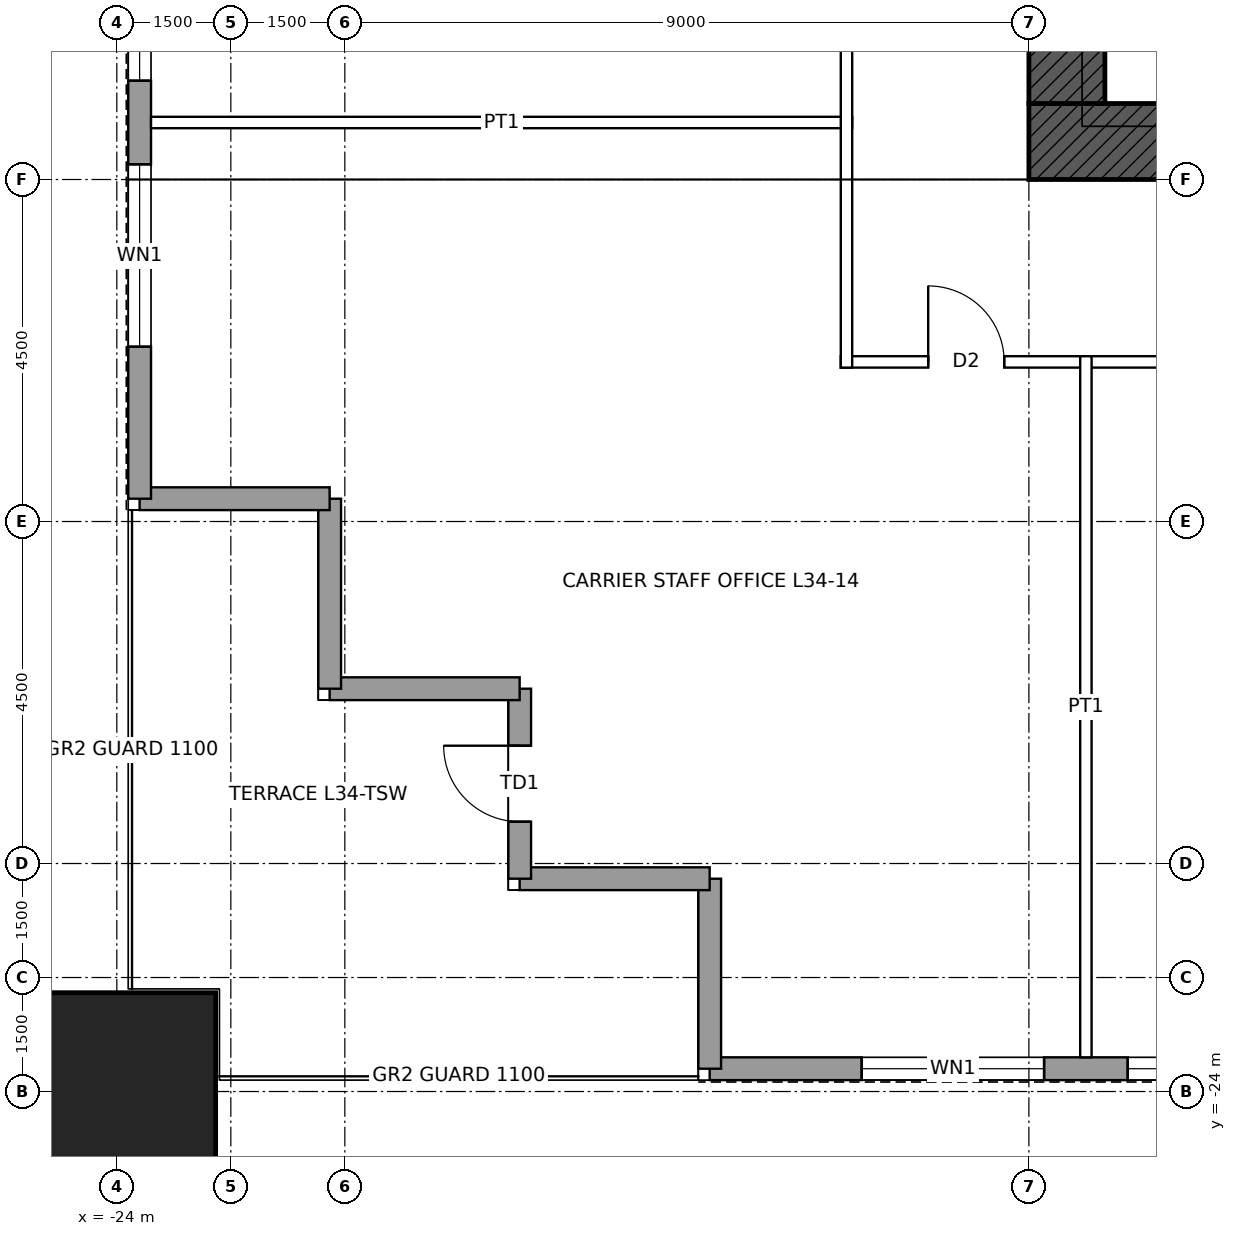
"""IFC4 building model, lengths in metres.
Left out: names, types, materials, properties, quantities, classifications, styles, units other than length and angle.
Written with IfcOpenShell. Run it as: python <this file> out.ifc"""

import sys

from ifc_helpers import new_model, si_unit, direction, frame, frame_2d, origin, origin_2d, place, context, subcontext, project, spatial, rectangle, hollow_rectangle, extrude, element, fill, save


model = new_model("IFC4")
c1 = context("Model", 3, precision=1e-05, world=origin(), true_north=direction((0.0, 1.0)))
c2 = subcontext(c1, "Body", "Model", "MODEL_VIEW")
j1 = project(units=[si_unit("LENGTHUNIT", "METRE"), si_unit("PLANEANGLEUNIT", "RADIAN")], contexts=[c1])
p1 = place(None, origin())
s1 = spatial("IfcSite", under=j1, at=p1, CompositionType="ELEMENT")
p2 = place(p1, origin())
s2 = spatial("IfcBuilding", under=s1, at=p2, CompositionType="ELEMENT")
p3 = place(p2, frame((0.0, 0.0, 167.4)))
s3 = spatial("IfcBuildingStorey", under=s2, at=p3, CompositionType="ELEMENT", Elevation=167.4)
p4 = place(p3, frame((-24.0, -24.0, 0.0), z_axis=(0.0, 0.0, 1.0), x_axis=(1.0, 0.0, 0.0)))
e1 = element("IfcColumn", 1, at=p4, inside=s3, PredefinedType="COLUMN", context=c2, shape_type="SweptSolid", body=[
    extrude(hollow_rectangle(XDim=2.6, YDim=2.6, WallThickness=0.13, at=origin_2d()), origin(), (0.0, 0.0, 1.0), 4.5),
])
p5 = place(p3, frame((12.0, -11.5, 0.0), z_axis=(0.0, 0.0, 1.0), x_axis=(-1.0, 0.0, 0.0)))
e2 = element("IfcWall", 2, at=p5, inside=s3, PredefinedType="SHEAR", context=c2, shape_type="SweptSolid", body=[
    extrude(rectangle(XDim=24.0, YDim=1.0, at=frame_2d((12.0, 0.0))), origin(), (0.0, 0.0, 1.0), 4.5),
])
p6 = place(p5, frame((11.5, 0.0, 0.0)))
e3 = element("IfcOpeningElement", 3, at=p6, cuts=e2, PredefinedType="OPENING", context=c2, shape_type="SweptSolid", body=[
    extrude(rectangle(XDim=1.0, YDim=2.1, at=frame_2d((0.5, 1.05))), frame((0.0, 0.51, 0.0), z_axis=(0.0, -1.0, 0.0), x_axis=(1.0, 0.0, 0.0)), (0.0, 0.0, 1.0), 1.02),
])
p7 = place(p5, frame((1.0, 0.0, 0.0)))
e4 = element("IfcOpeningElement", 4, at=p7, cuts=e2, PredefinedType="OPENING", context=c2, shape_type="SweptSolid", body=[
    extrude(rectangle(XDim=1.0, YDim=2.4, at=frame_2d((0.5, 1.2))), frame((0.0, 0.51, 0.0), z_axis=(0.0, -1.0, 0.0), x_axis=(1.0, 0.0, 0.0)), (0.0, 0.0, 1.0), 1.02),
])
p8 = place(p3, frame((-11.5, -11.0, 0.0), z_axis=(0.0, 0.0, 1.0), x_axis=(0.0, 1.0, 0.0)))
e5 = element("IfcWall", 5, at=p8, inside=s3, PredefinedType="SHEAR", context=c2, shape_type="SweptSolid", body=[
    extrude(rectangle(XDim=22.0, YDim=1.0, at=frame_2d((11.0, 0.0))), origin(), (0.0, 0.0, 1.0), 4.5),
])
p9 = place(p8, frame((10.5, 0.0, 0.0)))
e6 = element("IfcOpeningElement", 6, at=p9, cuts=e5, PredefinedType="OPENING", context=c2, shape_type="SweptSolid", body=[
    extrude(rectangle(XDim=1.0, YDim=2.4, at=frame_2d((0.5, 1.2))), frame((0.0, 0.51, 0.0), z_axis=(0.0, -1.0, 0.0), x_axis=(1.0, 0.0, 0.0)), (0.0, 0.0, 1.0), 1.02),
])
p10 = place(p3, frame((16.2, -23.7, 0.0), z_axis=(0.0, 0.0, 1.0), x_axis=(-1.0, 0.0, 0.0)))
e7 = element("IfcWall", 7, at=p10, inside=s3, PredefinedType="SOLIDWALL", context=c2, shape_type="SweptSolid", body=[
    extrude(rectangle(XDim=32.4, YDim=0.3, at=frame_2d((16.2, 0.0))), origin(), (0.0, 0.0, 1.0), 4.25),
])
p11 = place(p10, frame((2.0, 0.0, 1.0)))
e8 = element("IfcOpeningElement", 8, at=p11, cuts=e7, PredefinedType="OPENING", context=c2, shape_type="SweptSolid", body=[
    extrude(rectangle(XDim=2.4, YDim=1.2, at=frame_2d((1.2, 0.6))), frame((0.0, 0.16, 0.0), z_axis=(0.0, -1.0, 0.0), x_axis=(1.0, 0.0, 0.0)), (0.0, 0.0, 1.0), 0.32),
])
p12 = place(p10, frame((5.5, 0.0, 1.0)))
e9 = element("IfcOpeningElement", 9, at=p12, cuts=e7, PredefinedType="OPENING", context=c2, shape_type="SweptSolid", body=[
    extrude(rectangle(XDim=2.4, YDim=1.2, at=frame_2d((1.2, 0.6))), frame((0.0, 0.16, 0.0), z_axis=(0.0, -1.0, 0.0), x_axis=(1.0, 0.0, 0.0)), (0.0, 0.0, 1.0), 0.32),
])
p13 = place(p10, frame((9.5, 0.0, 1.0)))
e10 = element("IfcOpeningElement", 10, at=p13, cuts=e7, PredefinedType="OPENING", context=c2, shape_type="SweptSolid", body=[
    extrude(rectangle(XDim=2.4, YDim=1.2, at=frame_2d((1.2, 0.6))), frame((0.0, 0.16, 0.0), z_axis=(0.0, -1.0, 0.0), x_axis=(1.0, 0.0, 0.0)), (0.0, 0.0, 1.0), 0.32),
])
p14 = place(p10, frame((13.0, 0.0, 1.0)))
e11 = element("IfcOpeningElement", 11, at=p14, cuts=e7, PredefinedType="OPENING", context=c2, shape_type="SweptSolid", body=[
    extrude(rectangle(XDim=2.4, YDim=1.2, at=frame_2d((1.2, 0.6))), frame((0.0, 0.16, 0.0), z_axis=(0.0, -1.0, 0.0), x_axis=(1.0, 0.0, 0.0)), (0.0, 0.0, 1.0), 0.32),
])
p15 = place(p10, frame((17.0, 0.0, 1.0)))
e12 = element("IfcOpeningElement", 12, at=p15, cuts=e7, PredefinedType="OPENING", context=c2, shape_type="SweptSolid", body=[
    extrude(rectangle(XDim=2.4, YDim=1.2, at=frame_2d((1.2, 0.6))), frame((0.0, 0.16, 0.0), z_axis=(0.0, -1.0, 0.0), x_axis=(1.0, 0.0, 0.0)), (0.0, 0.0, 1.0), 0.32),
])
p16 = place(p10, frame((20.5, 0.0, 1.0)))
e13 = element("IfcOpeningElement", 13, at=p16, cuts=e7, PredefinedType="OPENING", context=c2, shape_type="SweptSolid", body=[
    extrude(rectangle(XDim=2.4, YDim=1.2, at=frame_2d((1.2, 0.6))), frame((0.0, 0.16, 0.0), z_axis=(0.0, -1.0, 0.0), x_axis=(1.0, 0.0, 0.0)), (0.0, 0.0, 1.0), 0.32),
])
p17 = place(p10, frame((24.5, 0.0, 1.0)))
e14 = element("IfcOpeningElement", 14, at=p17, cuts=e7, PredefinedType="OPENING", context=c2, shape_type="SweptSolid", body=[
    extrude(rectangle(XDim=2.4, YDim=1.2, at=frame_2d((1.2, 0.6))), frame((0.0, 0.16, 0.0), z_axis=(0.0, -1.0, 0.0), x_axis=(1.0, 0.0, 0.0)), (0.0, 0.0, 1.0), 0.32),
])
p18 = place(p10, frame((28.0, 0.0, 1.0)))
e15 = element("IfcOpeningElement", 15, at=p18, cuts=e7, PredefinedType="OPENING", context=c2, shape_type="SweptSolid", body=[
    extrude(rectangle(XDim=2.4, YDim=1.2, at=frame_2d((1.2, 0.6))), frame((0.0, 0.16, 0.0), z_axis=(0.0, -1.0, 0.0), x_axis=(1.0, 0.0, 0.0)), (0.0, 0.0, 1.0), 0.32),
])
for number, where, z_axis, x_axis in (
    (16, (-16.2, -23.7, 0.0), (0.0, 0.0, 1.0), (0.0, 1.0, 0.0)),
    (17, (-16.2, -21.2, 0.0), (0.0, 0.0, 1.0), (-1.0, 0.0, 0.0)),
):
    element("IfcWall", number, at=place(p3, frame(where, z_axis=z_axis, x_axis=x_axis)), inside=s3, PredefinedType="SOLIDWALL", context=c2, shape_type="SweptSolid", body=[
        extrude(rectangle(XDim=2.5, YDim=0.3, at=frame_2d((1.25, 0.0))), origin(), (0.0, 0.0, 1.0), 4.25),
    ])
p19 = place(p3, frame((-18.7, -21.2, 0.0), z_axis=(0.0, 0.0, 1.0), x_axis=(0.0, 1.0, 0.0)))
e18 = element("IfcWall", 18, at=p19, inside=s3, PredefinedType="SOLIDWALL", context=c2, shape_type="SweptSolid", body=[
    extrude(rectangle(XDim=2.5, YDim=0.3, at=frame_2d((1.25, 0.0))), origin(), (0.0, 0.0, 1.0), 4.25),
])
p20 = place(p19, frame((0.75, 0.0, 0.0)))
e19 = element("IfcOpeningElement", 19, at=p20, cuts=e18, PredefinedType="OPENING", context=c2, shape_type="SweptSolid", body=[
    extrude(rectangle(XDim=1.0, YDim=2.4, at=frame_2d((0.5, 1.2))), frame((0.0, 0.16, 0.0), z_axis=(0.0, -1.0, 0.0), x_axis=(1.0, 0.0, 0.0)), (0.0, 0.0, 1.0), 0.32),
])
for number, where, z_axis, x_axis in (
    (20, (-18.7, -18.7, 0.0), (0.0, 0.0, 1.0), (-1.0, 0.0, 0.0)),
    (21, (-21.2, -18.7, 0.0), (0.0, 0.0, 1.0), (0.0, 1.0, 0.0)),
    (22, (-21.2, -16.2, 0.0), (0.0, 0.0, 1.0), (-1.0, 0.0, 0.0)),
):
    element("IfcWall", number, at=place(p3, frame(where, z_axis=z_axis, x_axis=x_axis)), inside=s3, PredefinedType="SOLIDWALL", context=c2, shape_type="SweptSolid", body=[
        extrude(rectangle(XDim=2.5, YDim=0.3, at=frame_2d((1.25, 0.0))), origin(), (0.0, 0.0, 1.0), 4.25),
    ])
p21 = place(p3, frame((-23.7, -16.2, 0.0), z_axis=(0.0, 0.0, 1.0), x_axis=(0.0, 1.0, 0.0)))
e23 = element("IfcWall", 23, at=p21, inside=s3, PredefinedType="SOLIDWALL", context=c2, shape_type="SweptSolid", body=[
    extrude(rectangle(XDim=32.4, YDim=0.3, at=frame_2d((16.2, 0.0))), origin(), (0.0, 0.0, 1.0), 4.25),
])
p22 = place(p21, frame((2.0, 0.0, 1.0)))
e24 = element("IfcOpeningElement", 24, at=p22, cuts=e23, PredefinedType="OPENING", context=c2, shape_type="SweptSolid", body=[
    extrude(rectangle(XDim=2.4, YDim=1.2, at=frame_2d((1.2, 0.6))), frame((0.0, 0.16, 0.0), z_axis=(0.0, -1.0, 0.0), x_axis=(1.0, 0.0, 0.0)), (0.0, 0.0, 1.0), 0.32),
])
p23 = place(p21, frame((5.5, 0.0, 1.0)))
e25 = element("IfcOpeningElement", 25, at=p23, cuts=e23, PredefinedType="OPENING", context=c2, shape_type="SweptSolid", body=[
    extrude(rectangle(XDim=2.4, YDim=1.2, at=frame_2d((1.2, 0.6))), frame((0.0, 0.16, 0.0), z_axis=(0.0, -1.0, 0.0), x_axis=(1.0, 0.0, 0.0)), (0.0, 0.0, 1.0), 0.32),
])
p24 = place(p21, frame((9.5, 0.0, 1.0)))
e26 = element("IfcOpeningElement", 26, at=p24, cuts=e23, PredefinedType="OPENING", context=c2, shape_type="SweptSolid", body=[
    extrude(rectangle(XDim=2.4, YDim=1.2, at=frame_2d((1.2, 0.6))), frame((0.0, 0.16, 0.0), z_axis=(0.0, -1.0, 0.0), x_axis=(1.0, 0.0, 0.0)), (0.0, 0.0, 1.0), 0.32),
])
p25 = place(p21, frame((13.0, 0.0, 1.0)))
e27 = element("IfcOpeningElement", 27, at=p25, cuts=e23, PredefinedType="OPENING", context=c2, shape_type="SweptSolid", body=[
    extrude(rectangle(XDim=2.4, YDim=1.2, at=frame_2d((1.2, 0.6))), frame((0.0, 0.16, 0.0), z_axis=(0.0, -1.0, 0.0), x_axis=(1.0, 0.0, 0.0)), (0.0, 0.0, 1.0), 0.32),
])
p26 = place(p21, frame((17.0, 0.0, 1.0)))
e28 = element("IfcOpeningElement", 28, at=p26, cuts=e23, PredefinedType="OPENING", context=c2, shape_type="SweptSolid", body=[
    extrude(rectangle(XDim=2.4, YDim=1.2, at=frame_2d((1.2, 0.6))), frame((0.0, 0.16, 0.0), z_axis=(0.0, -1.0, 0.0), x_axis=(1.0, 0.0, 0.0)), (0.0, 0.0, 1.0), 0.32),
])
p27 = place(p21, frame((20.5, 0.0, 1.0)))
e29 = element("IfcOpeningElement", 29, at=p27, cuts=e23, PredefinedType="OPENING", context=c2, shape_type="SweptSolid", body=[
    extrude(rectangle(XDim=2.4, YDim=1.2, at=frame_2d((1.2, 0.6))), frame((0.0, 0.16, 0.0), z_axis=(0.0, -1.0, 0.0), x_axis=(1.0, 0.0, 0.0)), (0.0, 0.0, 1.0), 0.32),
])
p28 = place(p21, frame((24.5, 0.0, 1.0)))
e30 = element("IfcOpeningElement", 30, at=p28, cuts=e23, PredefinedType="OPENING", context=c2, shape_type="SweptSolid", body=[
    extrude(rectangle(XDim=2.4, YDim=1.2, at=frame_2d((1.2, 0.6))), frame((0.0, 0.16, 0.0), z_axis=(0.0, -1.0, 0.0), x_axis=(1.0, 0.0, 0.0)), (0.0, 0.0, 1.0), 0.32),
])
p29 = place(p21, frame((28.0, 0.0, 1.0)))
e31 = element("IfcOpeningElement", 31, at=p29, cuts=e23, PredefinedType="OPENING", context=c2, shape_type="SweptSolid", body=[
    extrude(rectangle(XDim=2.4, YDim=1.2, at=frame_2d((1.2, 0.6))), frame((0.0, 0.16, 0.0), z_axis=(0.0, -1.0, 0.0), x_axis=(1.0, 0.0, 0.0)), (0.0, 0.0, 1.0), 0.32),
])
p30 = place(p3, frame((-14.475, -14.4, 0.0), z_axis=(0.0, 0.0, 1.0), x_axis=(1.0, 0.0, 0.0)))
e32 = element("IfcWall", 32, at=p30, inside=s3, PredefinedType="PARTITIONING", context=c2, shape_type="SweptSolid", body=[
    extrude(rectangle(XDim=28.95, YDim=0.15, at=frame_2d((14.475, 0.0))), origin(), (0.0, 0.0, 1.0), 4.25),
])
p31 = place(p30, frame((21.075, 0.0, 0.0)))
e33 = element("IfcOpeningElement", 33, at=p31, cuts=e32, PredefinedType="OPENING", context=c2, shape_type="SweptSolid", body=[
    extrude(rectangle(XDim=1.8, YDim=2.4, at=frame_2d((0.9, 1.2))), frame((0.0, 0.085, 0.0), z_axis=(0.0, -1.0, 0.0), x_axis=(1.0, 0.0, 0.0)), (0.0, 0.0, 1.0), 0.17),
])
p32 = place(p30, frame((9.825, 0.0, 0.0)))
e34 = element("IfcOpeningElement", 34, at=p32, cuts=e32, PredefinedType="OPENING", context=c2, shape_type="SweptSolid", body=[
    extrude(rectangle(XDim=1.8, YDim=2.4, at=frame_2d((0.9, 1.2))), frame((0.0, 0.085, 0.0), z_axis=(0.0, -1.0, 0.0), x_axis=(1.0, 0.0, 0.0)), (0.0, 0.0, 1.0), 0.17),
])
p33 = place(p30, frame((26.8, 0.0, 0.0)))
e35 = element("IfcOpeningElement", 35, at=p33, cuts=e32, PredefinedType="OPENING", context=c2, shape_type="SweptSolid", body=[
    extrude(rectangle(XDim=1.0, YDim=2.1, at=frame_2d((0.5, 1.05))), frame((0.0, 0.085, 0.0), z_axis=(0.0, -1.0, 0.0), x_axis=(1.0, 0.0, 0.0)), (0.0, 0.0, 1.0), 0.17),
])
p34 = place(p30, frame((1.15, 0.0, 0.0)))
e36 = element("IfcOpeningElement", 36, at=p34, cuts=e32, PredefinedType="OPENING", context=c2, shape_type="SweptSolid", body=[
    extrude(rectangle(XDim=1.0, YDim=2.1, at=frame_2d((0.5, 1.05))), frame((0.0, 0.085, 0.0), z_axis=(0.0, -1.0, 0.0), x_axis=(1.0, 0.0, 0.0)), (0.0, 0.0, 1.0), 0.17),
])
p35 = place(p3, frame((-23.55, -11.25, 0.0), z_axis=(0.0, 0.0, 1.0), x_axis=(1.0, 0.0, 0.0)))
e37 = element("IfcWall", 37, at=p35, inside=s3, PredefinedType="PARTITIONING", context=c2, shape_type="SweptSolid", body=[
    extrude(rectangle(XDim=9.225, YDim=0.15, at=frame_2d((4.613, 0.0))), origin(), (0.0, 0.0, 1.0), 3.409),
])
p36 = place(p3, frame((-14.4, -14.475, 0.0), z_axis=(0.0, 0.0, 1.0), x_axis=(0.0, 1.0, 0.0)))
e38 = element("IfcWall", 38, at=p36, inside=s3, PredefinedType="PARTITIONING", context=c2, shape_type="SweptSolid", body=[
    extrude(rectangle(XDim=28.95, YDim=0.15, at=frame_2d((14.475, 0.0))), origin(), (0.0, 0.0, 1.0), 4.25),
])
p37 = place(p36, frame((6.075, 0.0, 0.0)))
e39 = element("IfcOpeningElement", 39, at=p37, cuts=e38, PredefinedType="OPENING", context=c2, shape_type="SweptSolid", body=[
    extrude(rectangle(XDim=1.8, YDim=2.4, at=frame_2d((0.9, 1.2))), frame((0.0, 0.085, 0.0), z_axis=(0.0, -1.0, 0.0), x_axis=(1.0, 0.0, 0.0)), (0.0, 0.0, 1.0), 0.17),
])
p38 = place(p36, frame((13.975, 0.0, 0.0)))
e40 = element("IfcOpeningElement", 40, at=p38, cuts=e38, PredefinedType="OPENING", context=c2, shape_type="SweptSolid", body=[
    extrude(rectangle(XDim=1.0, YDim=2.1, at=frame_2d((0.5, 1.05))), frame((0.0, 0.085, 0.0), z_axis=(0.0, -1.0, 0.0), x_axis=(1.0, 0.0, 0.0)), (0.0, 0.0, 1.0), 0.17),
])
p39 = place(p36, frame((21.475, 0.0, 0.0)))
e41 = element("IfcOpeningElement", 41, at=p39, cuts=e38, PredefinedType="OPENING", context=c2, shape_type="SweptSolid", body=[
    extrude(rectangle(XDim=1.0, YDim=2.1, at=frame_2d((0.5, 1.05))), frame((0.0, 0.085, 0.0), z_axis=(0.0, -1.0, 0.0), x_axis=(1.0, 0.0, 0.0)), (0.0, 0.0, 1.0), 0.17),
])
p40 = place(p3, frame((-11.25, -23.55, 0.0), z_axis=(0.0, 0.0, 1.0), x_axis=(0.0, 1.0, 0.0)))
e42 = element("IfcWall", 42, at=p40, inside=s3, PredefinedType="PARTITIONING", context=c2, shape_type="SweptSolid", body=[
    extrude(rectangle(XDim=9.225, YDim=0.15, at=frame_2d((4.613, 0.0))), origin(), (0.0, 0.0, 1.0), 3.409),
])
p41 = place(p17, origin())
e43 = element("IfcWindow", 43, at=p41, inside=s3, PartitioningType="SINGLE_PANEL", PredefinedType="WINDOW", context=c2, shape_type="SweptSolid", body=[
    extrude(rectangle(XDim=2.4, YDim=1.2, at=frame_2d((1.2, 0.6))), frame((0.0, 0.03, 0.0), z_axis=(0.0, -1.0, 0.0), x_axis=(1.0, 0.0, 0.0)), (0.0, 0.0, 1.0), 0.06),
])
fill(e14, e43)
p42 = place(p18, origin())
e44 = element("IfcWindow", 44, at=p42, inside=s3, PartitioningType="SINGLE_PANEL", PredefinedType="WINDOW", context=c2, shape_type="SweptSolid", body=[
    extrude(rectangle(XDim=2.4, YDim=1.2, at=frame_2d((1.2, 0.6))), frame((0.0, 0.03, 0.0), z_axis=(0.0, -1.0, 0.0), x_axis=(1.0, 0.0, 0.0)), (0.0, 0.0, 1.0), 0.06),
])
fill(e15, e44)
p43 = place(p20, origin())
e45 = element("IfcDoor", 45, at=p43, inside=s3, OperationType="SINGLE_SWING_RIGHT", PredefinedType="DOOR", context=c2, shape_type="SweptSolid", body=[
    extrude(rectangle(XDim=1.0, YDim=2.4, at=frame_2d((0.5, 1.2))), frame((0.0, 0.025, 0.0), z_axis=(0.0, -1.0, 0.0), x_axis=(1.0, 0.0, 0.0)), (0.0, 0.0, 1.0), 0.05),
])
fill(e19, e45)
p44 = place(p22, origin())
e46 = element("IfcWindow", 46, at=p44, inside=s3, PartitioningType="SINGLE_PANEL", PredefinedType="WINDOW", context=c2, shape_type="SweptSolid", body=[
    extrude(rectangle(XDim=2.4, YDim=1.2, at=frame_2d((1.2, 0.6))), frame((0.0, 0.03, 0.0), z_axis=(0.0, -1.0, 0.0), x_axis=(1.0, 0.0, 0.0)), (0.0, 0.0, 1.0), 0.06),
])
fill(e24, e46)
p45 = place(p23, origin())
e47 = element("IfcWindow", 47, at=p45, inside=s3, PartitioningType="SINGLE_PANEL", PredefinedType="WINDOW", context=c2, shape_type="SweptSolid", body=[
    extrude(rectangle(XDim=2.4, YDim=1.2, at=frame_2d((1.2, 0.6))), frame((0.0, 0.03, 0.0), z_axis=(0.0, -1.0, 0.0), x_axis=(1.0, 0.0, 0.0)), (0.0, 0.0, 1.0), 0.06),
])
fill(e25, e47)
p46 = place(p34, origin())
e48 = element("IfcDoor", 48, at=p46, inside=s3, OperationType="SINGLE_SWING_LEFT", PredefinedType="DOOR", context=c2, shape_type="SweptSolid", body=[
    extrude(rectangle(XDim=1.0, YDim=2.1, at=frame_2d((0.5, 1.05))), frame((0.0, 0.025, 0.0), z_axis=(0.0, -1.0, 0.0), x_axis=(1.0, 0.0, 0.0)), (0.0, 0.0, 1.0), 0.05),
])
fill(e36, e48)
save(model, sys.argv[1])
